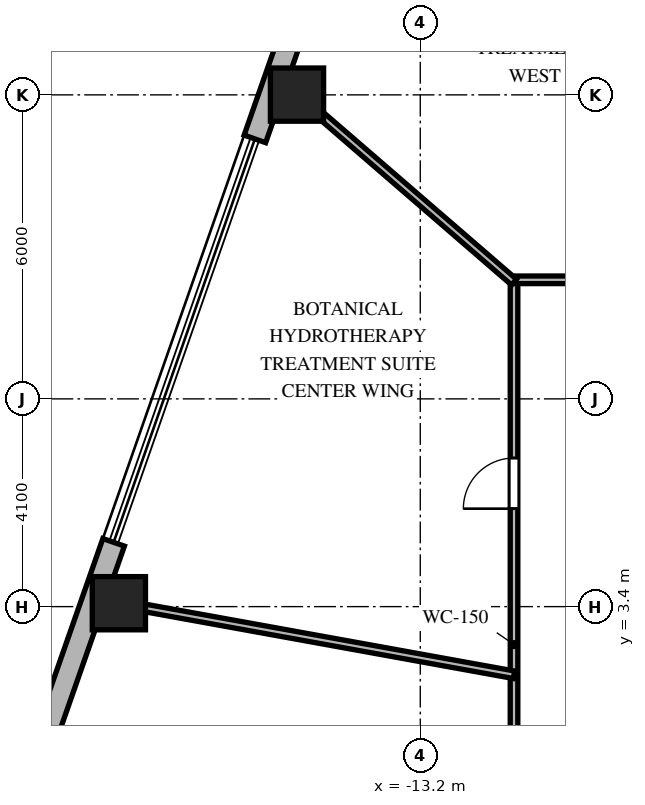
"""IFC4 building model, lengths in metres.
Left out: names, types, materials, properties, quantities, classifications, styles, units other than length and angle.
Written with IfcOpenShell. Run it as: python <this file> out.ifc"""

import sys

from ifc_helpers import new_model, si_unit, direction, frame, frame_2d, origin, origin_2d, place, context, subcontext, project, spatial, rectangle, extrude, element, fill, save


model = new_model("IFC4")
c1 = context("Model", 3, precision=1e-05, world=origin(), true_north=direction((0.0, 1.0)))
c2 = subcontext(c1, "Body", "Model", "MODEL_VIEW")
j1 = project(units=[si_unit("LENGTHUNIT", "METRE"), si_unit("PLANEANGLEUNIT", "RADIAN")], contexts=[c1])
p1 = place(None, origin())
s1 = spatial("IfcSite", under=j1, at=p1, CompositionType="ELEMENT")
p2 = place(p1, origin())
s2 = spatial("IfcBuilding", under=s1, at=p2, CompositionType="ELEMENT")
p3 = place(p2, frame((0.0, 0.0, 201.5)))
s3 = spatial("IfcBuildingStorey", under=s2, at=p3, CompositionType="ELEMENT", Elevation=201.5)
for number, where, z_axis, x_axis in (
    (1, (-15.633, 13.505, 0.0), (0.0, 0.0, 1.0), (1.0, 0.0, 0.0)),
    (2, (-19.148, 3.467, 0.0), (0.0, 0.0, 1.0), (1.0, 0.0, 0.0)),
):
    element("IfcColumn", number, at=place(p3, frame(where, z_axis=z_axis, x_axis=x_axis)), inside=s3, PredefinedType="COLUMN", context=c2, shape_type="SweptSolid", body=[
        extrude(rectangle(XDim=1.05, YDim=1.05, at=origin_2d()), origin(), (0.0, 0.0, 1.0), 5.0),
    ])
p4 = place(p3, frame((-14.937, 16.993, 0.0), z_axis=(0.0, 0.0, 1.0), x_axis=(-0.330437475159, -0.943827884209, 0.0)))
e3 = element("IfcWall", 3, at=p4, inside=s3, PredefinedType="SOLIDWALL", context=c2, shape_type="SweptSolid", body=[
    extrude(rectangle(XDim=4.622, YDim=0.45, at=frame_2d((2.311, 0.0))), origin(), (0.0, 0.0, 1.0), 4.7),
])
p5 = place(p3, frame((-19.252, 4.669, 0.0), z_axis=(0.0, 0.0, 1.0), x_axis=(-0.330411483424, -0.943836983606, 0.0)))
e4 = element("IfcWall", 4, at=p5, inside=s3, PredefinedType="SOLIDWALL", context=c2, shape_type="SweptSolid", body=[
    extrude(rectangle(XDim=4.631, YDim=0.45, at=frame_2d((2.315, 0.0))), origin(), (0.0, 0.0, 1.0), 4.7),
])
p6 = place(p3, frame((-11.35, -9.85, 0.0), z_axis=(0.0, 0.0, 1.0), x_axis=(0.0, 1.0, 0.0)))
e5 = element("IfcWall", 5, at=p6, inside=s3, PredefinedType="PARTITIONING", context=c2, shape_type="SweptSolid", body=[
    extrude(rectangle(XDim=19.7, YDim=0.15, at=frame_2d((9.85, 0.0))), origin(), (0.0, 0.0, 1.0), 2.89),
])
p7 = place(p6, frame((15.183, 0.0, 0.0)))
e6 = element("IfcOpeningElement", 6, at=p7, cuts=e5, PredefinedType="OPENING", context=c2, shape_type="SweptSolid", body=[
    extrude(rectangle(XDim=1.0, YDim=2.03, at=frame_2d((0.5, 1.015))), frame((0.0, 0.085, 0.0), z_axis=(0.0, -1.0, 0.0), x_axis=(1.0, 0.0, 0.0)), (0.0, 0.0, 1.0), 0.17),
])
p8 = place(p6, frame((8.819, 0.0, 0.0)))
e7 = element("IfcOpeningElement", 7, at=p8, cuts=e5, PredefinedType="OPENING", context=c2, shape_type="SweptSolid", body=[
    extrude(rectangle(XDim=1.0, YDim=2.03, at=frame_2d((0.5, 1.015))), frame((0.0, 0.085, 0.0), z_axis=(0.0, -1.0, 0.0), x_axis=(1.0, 0.0, 0.0)), (0.0, 0.0, 1.0), 0.17),
])
p9 = place(p6, frame((2.989, 0.0, 0.0)))
e8 = element("IfcOpeningElement", 8, at=p9, cuts=e5, PredefinedType="OPENING", context=c2, shape_type="SweptSolid", body=[
    extrude(rectangle(XDim=1.0, YDim=2.03, at=frame_2d((0.5, 1.015))), frame((0.0, 0.085, 0.0), z_axis=(0.0, -1.0, 0.0), x_axis=(1.0, 0.0, 0.0)), (0.0, 0.0, 1.0), 0.17),
])
p10 = place(p3, frame((-11.35, 9.85, 0.0), z_axis=(0.0, 0.0, 1.0), x_axis=(1.0, 0.0, 0.0)))
e9 = element("IfcWall", 9, at=p10, inside=s3, PredefinedType="PARTITIONING", context=c2, shape_type="SweptSolid", body=[
    extrude(rectangle(XDim=22.7, YDim=0.15, at=frame_2d((11.35, 0.0))), origin(), (0.0, 0.0, 1.0), 2.89),
])
p11 = place(p10, frame((17.347, 0.0, 0.0)))
e10 = element("IfcOpeningElement", 10, at=p11, cuts=e9, PredefinedType="OPENING", context=c2, shape_type="SweptSolid", body=[
    extrude(rectangle(XDim=1.0, YDim=2.03, at=frame_2d((0.5, 1.015))), frame((0.0, 0.085, 0.0), z_axis=(0.0, -1.0, 0.0), x_axis=(1.0, 0.0, 0.0)), (0.0, 0.0, 1.0), 0.17),
])
p12 = place(p10, frame((10.423, 0.0, 0.0)))
e11 = element("IfcOpeningElement", 11, at=p12, cuts=e9, PredefinedType="OPENING", context=c2, shape_type="SweptSolid", body=[
    extrude(rectangle(XDim=1.0, YDim=2.03, at=frame_2d((0.5, 1.015))), frame((0.0, 0.085, 0.0), z_axis=(0.0, -1.0, 0.0), x_axis=(1.0, 0.0, 0.0)), (0.0, 0.0, 1.0), 0.17),
])
p13 = place(p10, frame((3.362, 0.0, 0.0)))
e12 = element("IfcOpeningElement", 12, at=p13, cuts=e9, PredefinedType="OPENING", context=c2, shape_type="SweptSolid", body=[
    extrude(rectangle(XDim=1.0, YDim=2.03, at=frame_2d((0.5, 1.015))), frame((0.0, 0.085, 0.0), z_axis=(0.0, -1.0, 0.0), x_axis=(1.0, 0.0, 0.0)), (0.0, 0.0, 1.0), 0.17),
])
p14 = place(p3, frame((-11.35, 9.805, 0.0), z_axis=(0.0, 0.0, 1.0), x_axis=(-0.75671839422, 0.653740982232, 0.0)))
e13 = element("IfcWall", 13, at=p14, inside=s3, PredefinedType="PARTITIONING", context=c2, shape_type="SweptSolid", body=[
    extrude(rectangle(XDim=6.193, YDim=0.15, at=frame_2d((3.096, 0.0))), origin(), (0.0, 0.0, 1.0), 2.89),
])
p15 = place(p3, frame((-11.35, 2.055, 0.0), z_axis=(0.0, 0.0, 1.0), x_axis=(-0.983999921986, 0.178168890468, 0.0)))
e14 = element("IfcWall", 14, at=p15, inside=s3, PredefinedType="PARTITIONING", context=c2, shape_type="SweptSolid", body=[
    extrude(rectangle(XDim=8.426, YDim=0.15, at=frame_2d((4.213, 0.0))), origin(), (0.0, 0.0, 1.0), 2.89),
])
p16 = place(p7, origin())
e15 = element("IfcDoor", 15, at=p16, inside=s3, OperationType="SINGLE_SWING_LEFT", PredefinedType="DOOR", context=c2, shape_type="SweptSolid", body=[
    extrude(rectangle(XDim=1.0, YDim=2.03, at=frame_2d((0.5, 1.015))), frame((0.0, 0.025, 0.0), z_axis=(0.0, -1.0, 0.0), x_axis=(1.0, 0.0, 0.0)), (0.0, 0.0, 1.0), 0.05),
])
fill(e6, e15)
save(model, sys.argv[1])
